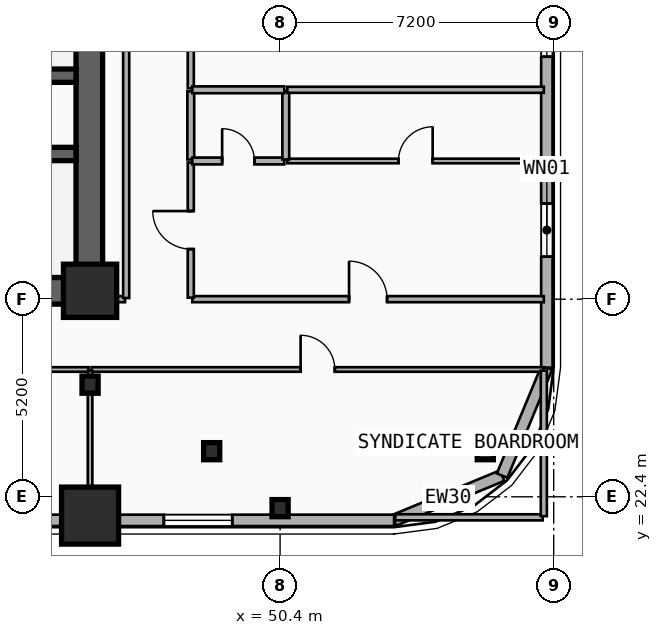
"""IFC4 building model, lengths in metres.
Left out: names, types, materials, properties, quantities, classifications, styles, units other than length and angle.
Written with IfcOpenShell. Run it as: python <this file> out.ifc"""

import sys

from ifc_helpers import new_model, si_unit, direction, frame, frame_2d, origin, origin_2d, place, context, subcontext, project, spatial, rectangle, i_section, extrude, element, fill, save


model = new_model("IFC4")
c1 = context("Model", 3, precision=1e-05, world=origin(), true_north=direction((0.0, 1.0)))
c2 = subcontext(c1, "Body", "Model", "MODEL_VIEW")
j1 = project(units=[si_unit("LENGTHUNIT", "METRE"), si_unit("PLANEANGLEUNIT", "RADIAN")], contexts=[c1])
p1 = place(None, origin())
s1 = spatial("IfcSite", under=j1, at=p1, CompositionType="ELEMENT")
p2 = place(p1, origin())
s2 = spatial("IfcBuilding", under=s1, at=p2, CompositionType="ELEMENT")
p3 = place(p2, frame((0.0, 0.0, 46.5)))
s3 = spatial("IfcBuildingStorey", under=s2, at=p3, CompositionType="ELEMENT", Elevation=46.5)
p4 = place(p3, frame((45.38, 27.82, 0.0), z_axis=(0.0, 0.0, 1.0), x_axis=(-1.0, 0.0, 0.0)))
e1 = element("IfcWall", 1, at=p4, inside=s3, PredefinedType="SHEAR", context=c2, shape_type="SweptSolid", body=[
    extrude(rectangle(XDim=12.23, YDim=0.7, at=frame_2d((6.115, 0.0))), origin(), (0.0, 0.0, 1.0), 3.5),
])
p5 = place(p4, frame((9.93, 0.0, 0.0)))
e2 = element("IfcOpeningElement", 2, at=p5, cuts=e1, PredefinedType="OPENING", context=c2, shape_type="SweptSolid", body=[
    extrude(rectangle(XDim=1.1, YDim=2.15, at=frame_2d((0.55, 1.075))), frame((0.0, 0.36, 0.0), z_axis=(0.0, -1.0, 0.0), x_axis=(1.0, 0.0, 0.0)), (0.0, 0.0, 1.0), 0.72),
])
p6 = place(p4, frame((6.23, 0.0, 0.0)))
e3 = element("IfcOpeningElement", 3, at=p6, cuts=e1, PredefinedType="OPENING", context=c2, shape_type="SweptSolid", body=[
    extrude(rectangle(XDim=1.1, YDim=2.15, at=frame_2d((0.55, 1.075))), frame((0.0, 0.36, 0.0), z_axis=(0.0, -1.0, 0.0), x_axis=(1.0, 0.0, 0.0)), (0.0, 0.0, 1.0), 0.72),
])
p7 = place(p3, frame((45.38, 28.17, 0.0), z_axis=(0.0, 0.0, 1.0), x_axis=(0.0, 1.0, 0.0)))
e4 = element("IfcWall", 4, at=p7, inside=s3, PredefinedType="SHEAR", context=c2, shape_type="SweptSolid", body=[
    extrude(rectangle(XDim=8.53, YDim=0.7, at=frame_2d((4.265, 0.0))), origin(), (0.0, 0.0, 1.0), 3.5),
])
p8 = place(p3, frame((45.03, 33.48, 0.0), z_axis=(0.0, 0.0, 1.0), x_axis=(-1.0, 0.0, 0.0)))
e5 = element("IfcWall", 5, at=p8, inside=s3, PredefinedType="SHEAR", context=c2, shape_type="SweptSolid", body=[
    extrude(rectangle(XDim=8.475, YDim=0.35, at=frame_2d((4.238, 0.0))), origin(), (0.0, 0.0, 1.0), 3.5),
])
p9 = place(p8, frame((7.13, 0.0, 0.0)))
e6 = element("IfcOpeningElement", 6, at=p9, cuts=e5, PredefinedType="OPENING", context=c2, shape_type="SweptSolid", body=[
    extrude(rectangle(XDim=1.1, YDim=2.15, at=frame_2d((0.55, 1.075))), frame((0.0, 0.185, 0.0), z_axis=(0.0, -1.0, 0.0), x_axis=(1.0, 0.0, 0.0)), (0.0, 0.0, 1.0), 0.37),
])
p10 = place(p3, frame((36.555, 31.42, 0.0), z_axis=(0.0, 0.0, 1.0), x_axis=(1.0, 0.0, 0.0)))
e7 = element("IfcWall", 7, at=p10, inside=s3, PredefinedType="SHEAR", context=c2, shape_type="SweptSolid", body=[
    extrude(rectangle(XDim=8.475, YDim=0.35, at=frame_2d((4.238, 0.0))), origin(), (0.0, 0.0, 1.0), 3.5),
])
p11 = place(p3, frame((45.4, 27.82, 0.0), z_axis=(0.0, 0.0, 1.0), x_axis=(1.0, 0.0, 0.0)))
e8 = element("IfcColumn", 8, at=p11, inside=s3, PredefinedType="COLUMN", context=c2, shape_type="SweptSolid", body=[
    extrude(rectangle(XDim=1.4, YDim=1.4, at=origin_2d()), origin(), (0.0, 0.0, 1.0), 3.5),
])
p12 = place(p3, frame((45.4, 25.35, 0.0), z_axis=(0.0, 0.0, 1.0), x_axis=(1.0, 0.0, 0.0)))
e9 = element("IfcColumn", 9, at=p12, inside=s3, PredefinedType="COLUMN", context=c2, shape_type="SweptSolid", body=[
    extrude(i_section(OverallWidth=0.424, OverallDepth=0.45, WebThickness=0.041, FlangeThickness=0.065, FilletRadius=0.015, at=origin_2d()), origin(), (0.0, 0.0, 1.0), 3.5),
])
p13 = place(p3, frame((45.4, 22.014, 0.0), z_axis=(0.0, -0.090241349316, 0.995919925935), x_axis=(1.0, 0.0, 0.0)))
e10 = element("IfcColumn", 10, at=p13, inside=s3, PredefinedType="COLUMN", context=c2, shape_type="SweptSolid", body=[
    extrude(rectangle(XDim=1.5, YDim=1.5, at=origin_2d()), origin(), (0.0, 0.0, 1.0), 3.514),
])
p14 = place(p3, frame((48.6, 23.6, 0.0), z_axis=(0.0, 0.0, 1.0), x_axis=(1.0, 0.0, 0.0)))
e11 = element("IfcColumn", 11, at=p14, inside=s3, PredefinedType="COLUMN", context=c2, shape_type="SweptSolid", body=[
    extrude(i_section(OverallWidth=0.424, OverallDepth=0.45, WebThickness=0.041, FlangeThickness=0.065, FilletRadius=0.015, at=origin_2d()), origin(), (0.0, 0.0, 1.0), 3.5),
])
p15 = place(p3, frame((50.4, 22.198, 0.0), z_axis=(0.0, -0.079891690793, 0.996803550226), x_axis=(1.0, 0.0, 0.0)))
e12 = element("IfcColumn", 12, at=p15, inside=s3, PredefinedType="COLUMN", context=c2, shape_type="SweptSolid", body=[
    extrude(i_section(OverallWidth=0.424, OverallDepth=0.45, WebThickness=0.041, FlangeThickness=0.065, FilletRadius=0.015, at=origin_2d()), origin(), (0.0, 0.0, 1.0), 3.511),
])
p16 = place(p3, frame((55.8, 23.6, 0.0), z_axis=(0.0, 0.0, 1.0), x_axis=(1.0, 0.0, 0.0)))
e13 = element("IfcColumn", 13, at=p16, inside=s3, PredefinedType="COLUMN", context=c2, shape_type="SweptSolid", body=[
    extrude(i_section(OverallWidth=0.424, OverallDepth=0.45, WebThickness=0.041, FlangeThickness=0.065, FilletRadius=0.015, at=origin_2d()), origin(), (0.0, 0.0, 1.0), 3.5),
])
p17 = place(p3, frame((56.243, 22.958, 0.0), z_axis=(0.0, 0.0, 1.0), x_axis=(-0.923882414032, -0.382676475685, 0.0)))
e14 = element("IfcWall", 14, at=p17, inside=s3, PredefinedType="SOLIDWALL", context=c2, shape_type="SweptSolid", body=[
    extrude(rectangle(XDim=3.077, YDim=0.3, at=frame_2d((1.539, 0.0))), origin(), (0.0, 0.0, 1.0), 3.24),
])
p18 = place(p3, frame((57.42, 25.8, 0.0), z_axis=(0.0, 0.0, 1.0), x_axis=(-0.382636798336, -0.92389884758, 0.0)))
e15 = element("IfcWall", 15, at=p18, inside=s3, PredefinedType="SOLIDWALL", context=c2, shape_type="SweptSolid", body=[
    extrude(rectangle(XDim=3.077, YDim=0.3, at=frame_2d((1.538, 0.0))), origin(), (0.0, 0.0, 1.0), 3.24),
])
p19 = place(p3, frame((57.42, 41.0, 0.0), z_axis=(0.0, 0.0, 1.0), x_axis=(0.0, -1.0, 0.0)))
e16 = element("IfcWall", 16, at=p19, inside=s3, PredefinedType="SOLIDWALL", context=c2, shape_type="SweptSolid", body=[
    extrude(rectangle(XDim=15.2, YDim=0.3, at=frame_2d((7.6, 0.0))), origin(), (0.0, 0.0, 1.0), 3.24),
])
p20 = place(p19, frame((10.882, 0.0, 0.48)))
e17 = element("IfcOpeningElement", 17, at=p20, cuts=e16, PredefinedType="OPENING", context=c2, shape_type="SweptSolid", body=[
    extrude(rectangle(XDim=1.4, YDim=1.8, at=frame_2d((0.7, 0.9))), frame((0.0, 0.16, 0.0), z_axis=(0.0, -1.0, 0.0), x_axis=(1.0, 0.0, 0.0)), (0.0, 0.0, 1.0), 0.32),
])
p21 = place(p19, frame((5.621, 0.0, 0.48)))
e18 = element("IfcOpeningElement", 18, at=p21, cuts=e16, PredefinedType="OPENING", context=c2, shape_type="SweptSolid", body=[
    extrude(rectangle(XDim=1.4, YDim=1.8, at=frame_2d((0.7, 0.9))), frame((0.0, 0.16, 0.0), z_axis=(0.0, -1.0, 0.0), x_axis=(1.0, 0.0, 0.0)), (0.0, 0.0, 1.0), 0.32),
])
p22 = place(p3, frame((53.4, 21.78, 0.0), z_axis=(0.0, 0.0, 1.0), x_axis=(-1.0, 0.0, 0.0)))
e19 = element("IfcWall", 19, at=p22, inside=s3, PredefinedType="SOLIDWALL", context=c2, shape_type="SweptSolid", body=[
    extrude(rectangle(XDim=49.2, YDim=0.3, at=frame_2d((24.6, 0.0))), origin(), (0.0, 0.0, 1.0), 2.82),
])
p23 = place(p22, frame((46.896, 0.0, 0.65)))
e20 = element("IfcOpeningElement", 20, at=p23, cuts=e19, PredefinedType="OPENING", context=c2, shape_type="SweptSolid", body=[
    extrude(rectangle(XDim=1.8, YDim=1.8, at=frame_2d((0.9, 0.9))), frame((0.0, 0.16, 0.0), z_axis=(0.0, -1.0, 0.0), x_axis=(1.0, 0.0, 0.0)), (0.0, 0.0, 1.0), 0.32),
])
p24 = place(p22, frame((33.295, 0.0, 0.48)))
e21 = element("IfcOpeningElement", 21, at=p24, cuts=e19, PredefinedType="OPENING", context=c2, shape_type="SweptSolid", body=[
    extrude(rectangle(XDim=1.2, YDim=1.5, at=frame_2d((0.6, 0.75))), frame((0.0, 0.16, 0.0), z_axis=(0.0, -1.0, 0.0), x_axis=(1.0, 0.0, 0.0)), (0.0, 0.0, 1.0), 0.32),
])
p25 = place(p22, frame((9.195, 0.0, 0.34)))
e22 = element("IfcOpeningElement", 22, at=p25, cuts=e19, PredefinedType="OPENING", context=c2, shape_type="SweptSolid", body=[
    extrude(rectangle(XDim=1.2, YDim=1.5, at=frame_2d((0.6, 0.75))), frame((0.0, 0.16, 0.0), z_axis=(0.0, -1.0, 0.0), x_axis=(1.0, 0.0, 0.0)), (0.0, 0.0, 1.0), 0.32),
])
p26 = place(p22, frame((4.259, 0.0, 0.65)))
e23 = element("IfcOpeningElement", 23, at=p26, cuts=e19, PredefinedType="OPENING", context=c2, shape_type="SweptSolid", body=[
    extrude(rectangle(XDim=1.8, YDim=1.8, at=frame_2d((0.9, 0.9))), frame((0.0, 0.16, 0.0), z_axis=(0.0, -1.0, 0.0), x_axis=(1.0, 0.0, 0.0)), (0.0, 0.0, 1.0), 0.32),
])
p27 = place(p3, frame((48.09, 27.6, 0.0), z_axis=(0.0, 0.0, 1.0), x_axis=(1.0, 0.0, 0.0)))
e24 = element("IfcWall", 24, at=p27, inside=s3, PredefinedType="PARTITIONING", context=c2, shape_type="SweptSolid", body=[
    extrude(rectangle(XDim=9.25, YDim=0.16, at=frame_2d((4.625, 0.0))), origin(), (0.0, 0.0, 1.0), 2.57),
])
p28 = place(p27, frame((4.125, 0.0, 0.0)))
e25 = element("IfcOpeningElement", 25, at=p28, cuts=e24, PredefinedType="OPENING", context=c2, shape_type="SweptSolid", body=[
    extrude(rectangle(XDim=1.0, YDim=2.15, at=frame_2d((0.5, 1.075))), frame((0.0, 0.09, 0.0), z_axis=(0.0, -1.0, 0.0), x_axis=(1.0, 0.0, 0.0)), (0.0, 0.0, 1.0), 0.18),
])
p29 = place(p3, frame((34.84, 25.75, 0.0), z_axis=(0.0, 0.0, 1.0), x_axis=(1.0, 0.0, 0.0)))
e26 = element("IfcWall", 26, at=p29, inside=s3, PredefinedType="PARTITIONING", context=c2, shape_type="SweptSolid", body=[
    extrude(rectangle(XDim=10.52, YDim=0.12, at=frame_2d((5.26, 0.0))), origin(), (0.0, 0.0, 1.0), 2.28),
])
p30 = place(p29, frame((4.81, 0.0, 0.0)))
e27 = element("IfcOpeningElement", 27, at=p30, cuts=e26, PredefinedType="OPENING", context=c2, shape_type="SweptSolid", body=[
    extrude(rectangle(XDim=0.9, YDim=2.1, at=frame_2d((0.45, 1.05))), frame((0.0, 0.07, 0.0), z_axis=(0.0, -1.0, 0.0), x_axis=(1.0, 0.0, 0.0)), (0.0, 0.0, 1.0), 0.14),
])
p31 = place(p3, frame((45.44, 25.75, 0.0), z_axis=(0.0, 0.0, 1.0), x_axis=(1.0, 0.0, 0.0)))
e28 = element("IfcWall", 28, at=p31, inside=s3, PredefinedType="PARTITIONING", context=c2, shape_type="SweptSolid", body=[
    extrude(rectangle(XDim=11.9, YDim=0.12, at=frame_2d((5.95, 0.0))), origin(), (0.0, 0.0, 1.0), 2.28),
])
p32 = place(p31, frame((5.5, 0.0, 0.0)))
e29 = element("IfcOpeningElement", 29, at=p32, cuts=e28, PredefinedType="OPENING", context=c2, shape_type="SweptSolid", body=[
    extrude(rectangle(XDim=0.9, YDim=2.1, at=frame_2d((0.45, 1.05))), frame((0.0, 0.07, 0.0), z_axis=(0.0, -1.0, 0.0), x_axis=(1.0, 0.0, 0.0)), (0.0, 0.0, 1.0), 0.14),
])
p33 = place(p3, frame((48.05, 27.64, 0.0), z_axis=(0.0, 0.0, 1.0), x_axis=(0.0, 1.0, 0.0)))
e30 = element("IfcWall", 30, at=p33, inside=s3, PredefinedType="PARTITIONING", context=c2, shape_type="SweptSolid", body=[
    extrude(rectangle(XDim=3.556, YDim=0.16, at=frame_2d((1.778, 0.0))), origin(), (0.0, 0.0, 1.0), 3.24),
])
p34 = place(p33, frame((1.278, 0.0, 0.0)))
e31 = element("IfcOpeningElement", 31, at=p34, cuts=e30, PredefinedType="OPENING", context=c2, shape_type="SweptSolid", body=[
    extrude(rectangle(XDim=1.0, YDim=2.15, at=frame_2d((0.5, 1.075))), frame((0.0, 0.09, 0.0), z_axis=(0.0, -1.0, 0.0), x_axis=(1.0, 0.0, 0.0)), (0.0, 0.0, 1.0), 0.18),
])
p35 = place(p3, frame((48.05, 31.276, 0.0), z_axis=(0.0, 0.0, 1.0), x_axis=(0.0, 1.0, 0.0)))
e32 = element("IfcWall", 32, at=p35, inside=s3, PredefinedType="PLUMBINGWALL", context=c2, shape_type="SweptSolid", body=[
    extrude(rectangle(XDim=1.793, YDim=0.18, at=frame_2d((0.896, 0.0))), origin(), (0.0, 0.0, 1.0), 3.24),
])
p36 = place(p3, frame((48.05, 33.149, 0.0), z_axis=(0.0, 0.0, 1.0), x_axis=(0.0, 1.0, 0.0)))
e33 = element("IfcWall", 33, at=p36, inside=s3, PredefinedType="PARTITIONING", context=c2, shape_type="SweptSolid", body=[
    extrude(rectangle(XDim=3.061, YDim=0.16, at=frame_2d((1.531, 0.0))), origin(), (0.0, 0.0, 1.0), 3.24),
])
p37 = place(p36, frame((1.031, 0.0, 0.0)))
e34 = element("IfcOpeningElement", 34, at=p37, cuts=e33, PredefinedType="OPENING", context=c2, shape_type="SweptSolid", body=[
    extrude(rectangle(XDim=1.0, YDim=2.15, at=frame_2d((0.5, 1.075))), frame((0.0, 0.09, 0.0), z_axis=(0.0, -1.0, 0.0), x_axis=(1.0, 0.0, 0.0)), (0.0, 0.0, 1.0), 0.18),
])
p38 = place(p3, frame((48.09, 31.236, 0.0), z_axis=(0.0, 0.0, 1.0), x_axis=(1.0, 0.0, 0.0)))
e35 = element("IfcWall", 35, at=p38, inside=s3, PredefinedType="PLUMBINGWALL", context=c2, shape_type="SweptSolid", body=[
    extrude(rectangle(XDim=2.42, YDim=0.18, at=frame_2d((1.21, 0.0))), origin(), (0.0, 0.0, 1.0), 2.57),
])
p39 = place(p38, frame((0.785, 0.0, 0.0)))
e36 = element("IfcOpeningElement", 36, at=p39, cuts=e35, PredefinedType="OPENING", context=c2, shape_type="SweptSolid", body=[
    extrude(rectangle(XDim=0.85, YDim=2.1, at=frame_2d((0.425, 1.05))), frame((0.0, 0.1, 0.0), z_axis=(0.0, -1.0, 0.0), x_axis=(1.0, 0.0, 0.0)), (0.0, 0.0, 1.0), 0.2),
])
p40 = place(p3, frame((50.59, 31.236, 0.0), z_axis=(0.0, 0.0, 1.0), x_axis=(1.0, 0.0, 0.0)))
e37 = element("IfcWall", 37, at=p40, inside=s3, PredefinedType="PARTITIONING", context=c2, shape_type="SweptSolid", body=[
    extrude(rectangle(XDim=6.75, YDim=0.12, at=frame_2d((3.375, 0.0))), origin(), (0.0, 0.0, 1.0), 2.57),
])
p41 = place(p40, frame((2.925, 0.0, 0.0)))
e38 = element("IfcOpeningElement", 38, at=p41, cuts=e37, PredefinedType="OPENING", context=c2, shape_type="SweptSolid", body=[
    extrude(rectangle(XDim=0.9, YDim=2.1, at=frame_2d((0.45, 1.05))), frame((0.0, 0.07, 0.0), z_axis=(0.0, -1.0, 0.0), x_axis=(1.0, 0.0, 0.0)), (0.0, 0.0, 1.0), 0.14),
])
p42 = place(p3, frame((50.55, 31.276, 0.0), z_axis=(0.0, 0.0, 1.0), x_axis=(0.0, 1.0, 0.0)))
e39 = element("IfcWall", 39, at=p42, inside=s3, PredefinedType="PLUMBINGWALL", context=c2, shape_type="SweptSolid", body=[
    extrude(rectangle(XDim=1.793, YDim=0.18, at=frame_2d((0.896, 0.0))), origin(), (0.0, 0.0, 1.0), 2.57),
])
p43 = place(p3, frame((48.09, 33.109, 0.0), z_axis=(0.0, 0.0, 1.0), x_axis=(1.0, 0.0, 0.0)))
e40 = element("IfcWall", 40, at=p43, inside=s3, PredefinedType="PLUMBINGWALL", context=c2, shape_type="SweptSolid", body=[
    extrude(rectangle(XDim=2.42, YDim=0.18, at=frame_2d((1.21, 0.0))), origin(), (0.0, 0.0, 1.0), 2.57),
])
p44 = place(p3, frame((50.59, 33.109, 0.0), z_axis=(0.0, 0.0, 1.0), x_axis=(1.0, 0.0, 0.0)))
e41 = element("IfcWall", 41, at=p44, inside=s3, PredefinedType="PARTITIONING", context=c2, shape_type="SweptSolid", body=[
    extrude(rectangle(XDim=6.75, YDim=0.16, at=frame_2d((3.375, 0.0))), origin(), (0.0, 0.0, 1.0), 2.57),
])
p45 = place(p3, frame((45.4, 21.86, 0.0), z_axis=(0.0, 0.0, 1.0), x_axis=(0.0, 1.0, 0.0)))
e42 = element("IfcWall", 42, at=p45, inside=s3, PredefinedType="PARTITIONING", context=c2, shape_type="SweptSolid", body=[
    extrude(rectangle(XDim=3.85, YDim=0.12, at=frame_2d((1.925, 0.0))), origin(), (0.0, 0.0, 1.0), 2.28),
])
p46 = place(p3, frame((45.41, 27.6, 0.0), z_axis=(0.0, 0.0, 1.0), x_axis=(1.0, 0.0, 0.0)))
e43 = element("IfcWall", 43, at=p46, inside=s3, PredefinedType="PARTITIONING", context=c2, shape_type="SweptSolid", body=[
    extrude(rectangle(XDim=0.91, YDim=0.16, at=frame_2d((0.455, 0.0))), origin(), (0.0, 0.0, 1.0), 2.28),
])
p47 = place(p3, frame((46.35, 27.63, 0.0), z_axis=(0.0, 0.0, 1.0), x_axis=(0.0, 1.0, 0.0)))
e44 = element("IfcWall", 44, at=p47, inside=s3, PredefinedType="PARTITIONING", context=c2, shape_type="SweptSolid", body=[
    extrude(rectangle(XDim=10.24, YDim=0.16, at=frame_2d((5.12, 0.0))), origin(), (0.0, 0.0, 1.0), 2.72),
])
p48 = place(p3, frame((53.43, 21.86, 0.0), z_axis=(0.0, 0.0, 1.0), x_axis=(1.0, 0.0, 0.0)))
e45 = element("IfcWall", 45, at=p48, inside=s3, PredefinedType="PARTITIONING", context=c2, shape_type="SweptSolid", body=[
    extrude(rectangle(XDim=3.88, YDim=0.16, at=frame_2d((1.94, 0.0))), origin(), (0.0, 0.0, 1.0), 2.72),
])
p49 = place(p3, frame((57.34, 21.89, 0.0), z_axis=(0.0, 0.0, 1.0), x_axis=(0.0, 1.0, 0.0)))
e46 = element("IfcWall", 46, at=p49, inside=s3, PredefinedType="PARTITIONING", context=c2, shape_type="SweptSolid", body=[
    extrude(rectangle(XDim=3.83, YDim=0.16, at=frame_2d((1.915, 0.0))), origin(), (0.0, 0.0, 1.0), 3.24),
])
p50 = place(p20, origin())
e47 = element("IfcWindow", 47, at=p50, inside=s3, PartitioningType="SINGLE_PANEL", PredefinedType="WINDOW", context=c2, shape_type="SweptSolid", body=[
    extrude(rectangle(XDim=1.4, YDim=1.8, at=frame_2d((0.7, 0.9))), frame((0.0, 0.03, 0.0), z_axis=(0.0, -1.0, 0.0), x_axis=(1.0, 0.0, 0.0)), (0.0, 0.0, 1.0), 0.06),
])
fill(e17, e47)
p51 = place(p21, origin())
e48 = element("IfcWindow", 48, at=p51, inside=s3, PartitioningType="SINGLE_PANEL", PredefinedType="WINDOW", context=c2, shape_type="SweptSolid", body=[
    extrude(rectangle(XDim=1.4, YDim=1.8, at=frame_2d((0.7, 0.9))), frame((0.0, 0.03, 0.0), z_axis=(0.0, -1.0, 0.0), x_axis=(1.0, 0.0, 0.0)), (0.0, 0.0, 1.0), 0.06),
])
fill(e18, e48)
p52 = place(p26, origin())
e49 = element("IfcWindow", 49, at=p52, inside=s3, PartitioningType="SINGLE_PANEL", PredefinedType="WINDOW", context=c2, shape_type="SweptSolid", body=[
    extrude(rectangle(XDim=1.8, YDim=1.8, at=frame_2d((0.9, 0.9))), frame((0.0, 0.03, 0.0), z_axis=(0.0, -1.0, 0.0), x_axis=(1.0, 0.0, 0.0)), (0.0, 0.0, 1.0), 0.06),
])
fill(e23, e49)
p53 = place(p28, origin())
e50 = element("IfcDoor", 50, at=p53, inside=s3, OperationType="SINGLE_SWING_LEFT", PredefinedType="DOOR", context=c2, shape_type="SweptSolid", body=[
    extrude(rectangle(XDim=1.0, YDim=2.15, at=frame_2d((0.5, 1.075))), frame((0.0, 0.025, 0.0), z_axis=(0.0, -1.0, 0.0), x_axis=(1.0, 0.0, 0.0)), (0.0, 0.0, 1.0), 0.05),
])
fill(e25, e50)
p54 = place(p32, origin())
e51 = element("IfcDoor", 51, at=p54, inside=s3, OperationType="SINGLE_SWING_LEFT", PredefinedType="DOOR", context=c2, shape_type="SweptSolid", body=[
    extrude(rectangle(XDim=0.9, YDim=2.1, at=frame_2d((0.45, 1.05))), frame((0.0, 0.025, 0.0), z_axis=(0.0, -1.0, 0.0), x_axis=(1.0, 0.0, 0.0)), (0.0, 0.0, 1.0), 0.05),
])
fill(e29, e51)
p55 = place(p34, origin())
e52 = element("IfcDoor", 52, at=p55, inside=s3, OperationType="SINGLE_SWING_RIGHT", PredefinedType="DOOR", context=c2, shape_type="SweptSolid", body=[
    extrude(rectangle(XDim=1.0, YDim=2.15, at=frame_2d((0.5, 1.075))), frame((0.0, 0.025, 0.0), z_axis=(0.0, -1.0, 0.0), x_axis=(1.0, 0.0, 0.0)), (0.0, 0.0, 1.0), 0.05),
])
fill(e31, e52)
p56 = place(p39, origin())
e53 = element("IfcDoor", 53, at=p56, inside=s3, OperationType="SINGLE_SWING_LEFT", PredefinedType="DOOR", context=c2, shape_type="SweptSolid", body=[
    extrude(rectangle(XDim=0.85, YDim=2.1, at=frame_2d((0.425, 1.05))), frame((0.0, 0.025, 0.0), z_axis=(0.0, -1.0, 0.0), x_axis=(1.0, 0.0, 0.0)), (0.0, 0.0, 1.0), 0.05),
])
fill(e36, e53)
p57 = place(p41, origin())
e54 = element("IfcDoor", 54, at=p57, inside=s3, OperationType="SINGLE_SWING_RIGHT", PredefinedType="DOOR", context=c2, shape_type="SweptSolid", body=[
    extrude(rectangle(XDim=0.9, YDim=2.1, at=frame_2d((0.45, 1.05))), frame((0.0, 0.025, 0.0), z_axis=(0.0, -1.0, 0.0), x_axis=(1.0, 0.0, 0.0)), (0.0, 0.0, 1.0), 0.05),
])
fill(e38, e54)
save(model, sys.argv[1])
